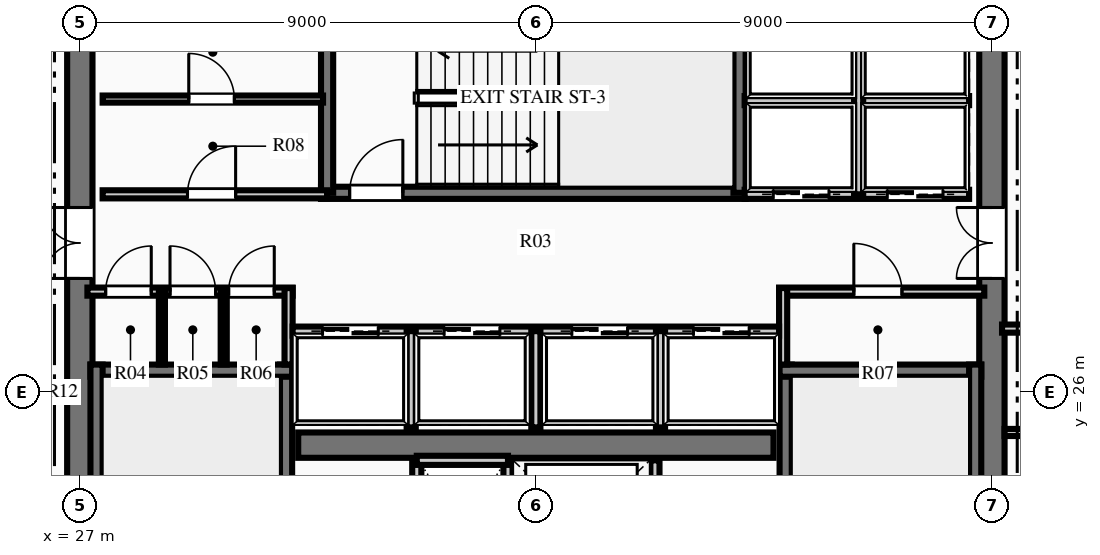
"""IFC4 building model, lengths in metres.
Left out: names, types, materials, properties, quantities, classifications, styles, units other than length and angle.
Written with IfcOpenShell. Run it as: python <this file> out.ifc"""

import sys

from ifc_helpers import new_model, si_unit, direction, frame, frame_2d, origin, place, context, subcontext, project, spatial, rectangle, extrude, element, fill, save


model = new_model("IFC4")
c1 = context("Model", 3, precision=1e-05, world=origin(), true_north=direction((0.0, 1.0)))
c2 = subcontext(c1, "Body", "Model", "MODEL_VIEW")
j1 = project(units=[si_unit("LENGTHUNIT", "METRE"), si_unit("PLANEANGLEUNIT", "RADIAN")], contexts=[c1])
p1 = place(None, origin())
s1 = spatial("IfcSite", under=j1, at=p1, CompositionType="ELEMENT")
p2 = place(p1, origin())
s2 = spatial("IfcBuilding", under=s1, at=p2, CompositionType="ELEMENT")
p3 = place(p2, frame((0.0, 0.0, 235.95)))
s3 = spatial("IfcBuildingStorey", under=s2, at=p3, CompositionType="ELEMENT", Elevation=235.95)
p4 = place(p3, frame((27.0, 18.25, 0.0), z_axis=(0.0, 0.0, 1.0), x_axis=(0.0, 1.0, 0.0)))
e1 = element("IfcWall", 1, at=p4, inside=s3, PredefinedType="SHEAR", context=c2, shape_type="SweptSolid", body=[
    extrude(rectangle(XDim=15.5, YDim=0.5, at=frame_2d((7.75, 0.0))), origin(), (0.0, 0.0, 1.0), 3.75),
])
p5 = place(p4, frame((9.99, 0.0, 0.0)))
e2 = element("IfcOpeningElement", 2, at=p5, cuts=e1, PredefinedType="OPENING", context=c2, shape_type="SweptSolid", body=[
    extrude(rectangle(XDim=1.4, YDim=2.2, at=frame_2d((0.7, 1.1))), frame((0.0, 0.26, 0.0), z_axis=(0.0, -1.0, 0.0), x_axis=(1.0, 0.0, 0.0)), (0.0, 0.0, 1.0), 0.52),
])
p6 = place(p3, frame((45.0, 18.25, 0.0), z_axis=(0.0, 0.0, 1.0), x_axis=(0.0, 1.0, 0.0)))
e3 = element("IfcWall", 3, at=p6, inside=s3, PredefinedType="SHEAR", context=c2, shape_type="SweptSolid", body=[
    extrude(rectangle(XDim=15.5, YDim=0.5, at=frame_2d((7.75, 0.0))), origin(), (0.0, 0.0, 1.0), 3.75),
])
p7 = place(p6, frame((9.99, 0.0, 0.0)))
e4 = element("IfcOpeningElement", 4, at=p7, cuts=e3, PredefinedType="OPENING", context=c2, shape_type="SweptSolid", body=[
    extrude(rectangle(XDim=1.4, YDim=2.2, at=frame_2d((0.7, 1.1))), frame((0.0, 0.26, 0.0), z_axis=(0.0, -1.0, 0.0), x_axis=(1.0, 0.0, 0.0)), (0.0, 0.0, 1.0), 0.52),
])
p8 = place(p3, frame((31.31, 24.95, 0.0), z_axis=(0.0, 0.0, 1.0), x_axis=(1.0, 0.0, 0.0)))
e5 = element("IfcWall", 5, at=p8, inside=s3, PredefinedType="SHEAR", context=c2, shape_type="SweptSolid", body=[
    extrude(rectangle(XDim=9.38, YDim=0.5, at=frame_2d((4.69, 0.0))), origin(), (0.0, 0.0, 1.0), 3.75),
])
p9 = place(p3, frame((31.07, 18.28, 0.0), z_axis=(0.0, 0.0, 1.0), x_axis=(0.0, 1.0, 0.0)))
e6 = element("IfcWall", 6, at=p9, inside=s3, PredefinedType="SHEAR", context=c2, shape_type="SweptSolid", body=[
    extrude(rectangle(XDim=8.26, YDim=0.24, at=frame_2d((4.13, 0.0))), origin(), (0.0, 0.0, 1.0), 3.75),
])
p10 = place(p9, frame((0.365, 0.0, 0.0)))
e7 = element("IfcOpeningElement", 7, at=p10, cuts=e6, PredefinedType="OPENING", context=c2, shape_type="SweptSolid", body=[
    extrude(rectangle(XDim=1.05, YDim=2.15, at=frame_2d((0.525, 1.075))), frame((0.0, 0.13, 0.0), z_axis=(0.0, -1.0, 0.0), x_axis=(1.0, 0.0, 0.0)), (0.0, 0.0, 1.0), 0.26),
])
p11 = place(p3, frame((27.21, 26.42, 0.0), z_axis=(0.0, 0.0, 1.0), x_axis=(1.0, 0.0, 0.0)))
e8 = element("IfcWall", 8, at=p11, inside=s3, PredefinedType="SHEAR", context=c2, shape_type="SweptSolid", body=[
    extrude(rectangle(XDim=3.98, YDim=0.24, at=frame_2d((1.99, 0.0))), origin(), (0.0, 0.0, 1.0), 3.75),
])
p12 = place(p3, frame((27.33, 18.28, 0.0), z_axis=(0.0, 0.0, 1.0), x_axis=(0.0, 1.0, 0.0)))
e9 = element("IfcWall", 9, at=p12, inside=s3, PredefinedType="SHEAR", context=c2, shape_type="SweptSolid", body=[
    extrude(rectangle(XDim=8.26, YDim=0.24, at=frame_2d((4.13, 0.0))), origin(), (0.0, 0.0, 1.0), 3.75),
])
p13 = place(p3, frame((40.93, 18.28, 0.0), z_axis=(0.0, 0.0, 1.0), x_axis=(0.0, 1.0, 0.0)))
e10 = element("IfcWall", 10, at=p13, inside=s3, PredefinedType="SHEAR", context=c2, shape_type="SweptSolid", body=[
    extrude(rectangle(XDim=8.26, YDim=0.24, at=frame_2d((4.13, 0.0))), origin(), (0.0, 0.0, 1.0), 3.75),
])
p14 = place(p13, frame((0.365, 0.0, 0.0)))
e11 = element("IfcOpeningElement", 11, at=p14, cuts=e10, PredefinedType="OPENING", context=c2, shape_type="SweptSolid", body=[
    extrude(rectangle(XDim=1.05, YDim=2.15, at=frame_2d((0.525, 1.075))), frame((0.0, 0.13, 0.0), z_axis=(0.0, -1.0, 0.0), x_axis=(1.0, 0.0, 0.0)), (0.0, 0.0, 1.0), 0.26),
])
p15 = place(p3, frame((40.81, 26.42, 0.0), z_axis=(0.0, 0.0, 1.0), x_axis=(1.0, 0.0, 0.0)))
e12 = element("IfcWall", 12, at=p15, inside=s3, PredefinedType="SHEAR", context=c2, shape_type="SweptSolid", body=[
    extrude(rectangle(XDim=3.98, YDim=0.24, at=frame_2d((1.99, 0.0))), origin(), (0.0, 0.0, 1.0), 3.75),
])
p16 = place(p3, frame((44.67, 18.28, 0.0), z_axis=(0.0, 0.0, 1.0), x_axis=(0.0, 1.0, 0.0)))
e13 = element("IfcWall", 13, at=p16, inside=s3, PredefinedType="SHEAR", context=c2, shape_type="SweptSolid", body=[
    extrude(rectangle(XDim=8.26, YDim=0.24, at=frame_2d((4.13, 0.0))), origin(), (0.0, 0.0, 1.0), 3.75),
])
p17 = place(p3, frame((31.76, 29.93, 0.0), z_axis=(0.0, 0.0, 1.0), x_axis=(1.0, 0.0, 0.0)))
e14 = element("IfcWall", 14, at=p17, inside=s3, PredefinedType="SHEAR", context=c2, shape_type="SweptSolid", body=[
    extrude(rectangle(XDim=8.38, YDim=0.24, at=frame_2d((4.19, 0.0))), origin(), (0.0, 0.0, 1.0), 3.75),
])
p18 = place(p17, frame((0.565, 0.0, 0.0)))
e15 = element("IfcOpeningElement", 15, at=p18, cuts=e14, PredefinedType="OPENING", context=c2, shape_type="SweptSolid", body=[
    extrude(rectangle(XDim=1.05, YDim=2.15, at=frame_2d((0.525, 1.075))), frame((0.0, 0.13, 0.0), z_axis=(0.0, -1.0, 0.0), x_axis=(1.0, 0.0, 0.0)), (0.0, 0.0, 1.0), 0.26),
])
p19 = place(p3, frame((31.88, 29.93, 0.0), z_axis=(0.0, 0.0, 1.0), x_axis=(0.0, 1.0, 0.0)))
e16 = element("IfcWall", 16, at=p19, inside=s3, PredefinedType="SHEAR", context=c2, shape_type="SweptSolid", body=[
    extrude(rectangle(XDim=3.79, YDim=0.24, at=frame_2d((1.895, 0.0))), origin(), (0.0, 0.0, 1.0), 3.75),
])
p20 = place(p3, frame((40.02, 29.93, 0.0), z_axis=(0.0, 0.0, 1.0), x_axis=(0.0, 1.0, 0.0)))
e17 = element("IfcWall", 17, at=p20, inside=s3, PredefinedType="SHEAR", context=c2, shape_type="SweptSolid", body=[
    extrude(rectangle(XDim=3.85, YDim=0.24, at=frame_2d((1.925, 0.0))), origin(), (0.0, 0.0, 1.0), 3.75),
])
for number, where, z_axis, x_axis in (
    (18, (33.65, 22.05, 0.0), (0.0, 0.0, 1.0), (0.0, 1.0, 0.0)),
    (19, (35.45, 22.05, 0.0), (0.0, 0.0, 1.0), (0.0, 1.0, 0.0)),
):
    element("IfcWall", number, at=place(p3, frame(where, z_axis=z_axis, x_axis=x_axis)), inside=s3, PredefinedType="PARTITIONING", context=c2, shape_type="SweptSolid", body=[
        extrude(rectangle(XDim=2.6, YDim=0.18, at=frame_2d((1.3, 0.0))), origin(), (0.0, 0.0, 1.0), 3.4),
    ])
p21 = place(p3, frame((33.65, 24.65, 0.0), z_axis=(0.0, 0.0, 1.0), x_axis=(1.0, 0.0, 0.0)))
e20 = element("IfcWall", 20, at=p21, inside=s3, PredefinedType="PARTITIONING", context=c2, shape_type="SweptSolid", body=[
    extrude(rectangle(XDim=1.8, YDim=0.18, at=frame_2d((0.9, 0.0))), origin(), (0.0, 0.0, 1.0), 3.4),
])
p22 = place(p3, frame((38.35, 22.05, 0.0), z_axis=(0.0, 0.0, 1.0), x_axis=(0.0, 1.0, 0.0)))
e21 = element("IfcWall", 21, at=p22, inside=s3, PredefinedType="PARTITIONING", context=c2, shape_type="SweptSolid", body=[
    extrude(rectangle(XDim=2.6, YDim=0.18, at=frame_2d((1.3, 0.0))), origin(), (0.0, 0.0, 1.0), 3.4),
])
p23 = place(p3, frame((27.15, 27.98, 0.0), z_axis=(0.0, 0.0, 1.0), x_axis=(1.0, 0.0, 0.0)))
e22 = element("IfcWall", 22, at=p23, inside=s3, PredefinedType="PARTITIONING", context=c2, shape_type="SweptSolid", body=[
    extrude(rectangle(XDim=4.05, YDim=0.16, at=frame_2d((2.025, 0.0))), origin(), (0.0, 0.0, 1.0), 3.4),
])
p24 = place(p23, frame((0.36, 0.0, 0.0)))
e23 = element("IfcOpeningElement", 23, at=p24, cuts=e22, PredefinedType="OPENING", context=c2, shape_type="SweptSolid", body=[
    extrude(rectangle(XDim=0.9, YDim=2.15, at=frame_2d((0.45, 1.075))), frame((0.0, 0.09, 0.0), z_axis=(0.0, -1.0, 0.0), x_axis=(1.0, 0.0, 0.0)), (0.0, 0.0, 1.0), 0.18),
])
p25 = place(p23, frame((1.63, 0.0, 0.0)))
e24 = element("IfcOpeningElement", 24, at=p25, cuts=e22, PredefinedType="OPENING", context=c2, shape_type="SweptSolid", body=[
    extrude(rectangle(XDim=0.9, YDim=2.15, at=frame_2d((0.45, 1.075))), frame((0.0, 0.09, 0.0), z_axis=(0.0, -1.0, 0.0), x_axis=(1.0, 0.0, 0.0)), (0.0, 0.0, 1.0), 0.18),
])
p26 = place(p23, frame((2.788, 0.0, 0.0)))
e25 = element("IfcOpeningElement", 25, at=p26, cuts=e22, PredefinedType="OPENING", context=c2, shape_type="SweptSolid", body=[
    extrude(rectangle(XDim=0.9, YDim=2.15, at=frame_2d((0.45, 1.075))), frame((0.0, 0.09, 0.0), z_axis=(0.0, -1.0, 0.0), x_axis=(1.0, 0.0, 0.0)), (0.0, 0.0, 1.0), 0.18),
])
p27 = place(p3, frame((31.12, 26.54, 0.0), z_axis=(0.0, 0.0, 1.0), x_axis=(0.0, 1.0, 0.0)))
e26 = element("IfcWall", 26, at=p27, inside=s3, PredefinedType="PARTITIONING", context=c2, shape_type="SweptSolid", body=[
    extrude(rectangle(XDim=1.51, YDim=0.16, at=frame_2d((0.755, 0.0))), origin(), (0.0, 0.0, 1.0), 3.4),
])
p28 = place(p3, frame((40.8, 27.98, 0.0), z_axis=(0.0, 0.0, 1.0), x_axis=(1.0, 0.0, 0.0)))
e27 = element("IfcWall", 27, at=p28, inside=s3, PredefinedType="PARTITIONING", context=c2, shape_type="SweptSolid", body=[
    extrude(rectangle(XDim=4.05, YDim=0.16, at=frame_2d((2.025, 0.0))), origin(), (0.0, 0.0, 1.0), 3.4),
])
p29 = place(p28, frame((1.475, 0.0, 0.0)))
e28 = element("IfcOpeningElement", 28, at=p29, cuts=e27, PredefinedType="OPENING", context=c2, shape_type="SweptSolid", body=[
    extrude(rectangle(XDim=0.95, YDim=2.15, at=frame_2d((0.475, 1.075))), frame((0.0, 0.09, 0.0), z_axis=(0.0, -1.0, 0.0), x_axis=(1.0, 0.0, 0.0)), (0.0, 0.0, 1.0), 0.18),
])
p30 = place(p3, frame((40.88, 26.54, 0.0), z_axis=(0.0, 0.0, 1.0), x_axis=(0.0, 1.0, 0.0)))
e29 = element("IfcWall", 29, at=p30, inside=s3, PredefinedType="PARTITIONING", context=c2, shape_type="SweptSolid", body=[
    extrude(rectangle(XDim=1.51, YDim=0.16, at=frame_2d((0.755, 0.0))), origin(), (0.0, 0.0, 1.0), 3.4),
])
for number, where, z_axis, x_axis in (
    (30, (28.62, 26.54, 0.0), (0.0, 0.0, 1.0), (0.0, 1.0, 0.0)),
    (31, (29.84, 26.54, 0.0), (0.0, 0.0, 1.0), (0.0, 1.0, 0.0)),
):
    element("IfcWall", number, at=place(p3, frame(where, z_axis=z_axis, x_axis=x_axis)), inside=s3, PredefinedType="PARTITIONING", context=c2, shape_type="SweptSolid", body=[
        extrude(rectangle(XDim=1.44, YDim=0.12, at=frame_2d((0.72, 0.0))), origin(), (0.0, 0.0, 1.0), 3.4),
    ])
p31 = place(p3, frame((27.45, 29.9, 0.0), z_axis=(0.0, 0.0, 1.0), x_axis=(1.0, 0.0, 0.0)))
e32 = element("IfcWall", 32, at=p31, inside=s3, PredefinedType="PARTITIONING", context=c2, shape_type="SweptSolid", body=[
    extrude(rectangle(XDim=4.43, YDim=0.16, at=frame_2d((2.215, 0.0))), origin(), (0.0, 0.0, 1.0), 3.4),
])
p32 = place(p31, frame((1.675, 0.0, 0.0)))
e33 = element("IfcOpeningElement", 33, at=p32, cuts=e32, PredefinedType="OPENING", context=c2, shape_type="SweptSolid", body=[
    extrude(rectangle(XDim=0.95, YDim=2.15, at=frame_2d((0.475, 1.075))), frame((0.0, 0.09, 0.0), z_axis=(0.0, -1.0, 0.0), x_axis=(1.0, 0.0, 0.0)), (0.0, 0.0, 1.0), 0.18),
])
p33 = place(p3, frame((27.45, 31.78, 0.0), z_axis=(0.0, 0.0, 1.0), x_axis=(1.0, 0.0, 0.0)))
e34 = element("IfcWall", 34, at=p33, inside=s3, PredefinedType="PARTITIONING", context=c2, shape_type="SweptSolid", body=[
    extrude(rectangle(XDim=4.35, YDim=0.14, at=frame_2d((2.175, 0.0))), origin(), (0.0, 0.0, 1.0), 3.4),
])
p34 = place(p33, frame((1.7, 0.0, 0.0)))
e35 = element("IfcOpeningElement", 35, at=p34, cuts=e34, PredefinedType="OPENING", context=c2, shape_type="SweptSolid", body=[
    extrude(rectangle(XDim=0.9, YDim=2.15, at=frame_2d((0.45, 1.075))), frame((0.0, 0.08, 0.0), z_axis=(0.0, -1.0, 0.0), x_axis=(1.0, 0.0, 0.0)), (0.0, 0.0, 1.0), 0.16),
])
p35 = place(p3, frame((40.12, 29.9, 0.0), z_axis=(0.0, 0.0, 1.0), x_axis=(1.0, 0.0, 0.0)))
e36 = element("IfcWall", 36, at=p35, inside=s3, PredefinedType="PARTITIONING", context=c2, shape_type="SweptSolid", body=[
    extrude(rectangle(XDim=4.43, YDim=0.18, at=frame_2d((2.215, 0.0))), origin(), (0.0, 0.0, 1.0), 3.4),
])
p36 = place(p35, frame((0.565, 0.0, 0.0)))
e37 = element("IfcOpeningElement", 37, at=p36, cuts=e36, PredefinedType="OPENING", context=c2, shape_type="SweptSolid", body=[
    extrude(rectangle(XDim=1.1, YDim=2.15, at=frame_2d((0.55, 1.075))), frame((0.0, 0.1, 0.0), z_axis=(0.0, -1.0, 0.0), x_axis=(1.0, 0.0, 0.0)), (0.0, 0.0, 1.0), 0.2),
])
p37 = place(p35, frame((2.815, 0.0, 0.0)))
e38 = element("IfcOpeningElement", 38, at=p37, cuts=e36, PredefinedType="OPENING", context=c2, shape_type="SweptSolid", body=[
    extrude(rectangle(XDim=1.1, YDim=2.15, at=frame_2d((0.55, 1.075))), frame((0.0, 0.1, 0.0), z_axis=(0.0, -1.0, 0.0), x_axis=(1.0, 0.0, 0.0)), (0.0, 0.0, 1.0), 0.2),
])
p38 = place(p3, frame((40.12, 31.75, 0.0), z_axis=(0.0, 0.0, 1.0), x_axis=(1.0, 0.0, 0.0)))
e39 = element("IfcWall", 39, at=p38, inside=s3, PredefinedType="PARTITIONING", context=c2, shape_type="SweptSolid", body=[
    extrude(rectangle(XDim=4.43, YDim=0.18, at=frame_2d((2.215, 0.0))), origin(), (0.0, 0.0, 1.0), 3.4),
])
p39 = place(p3, frame((42.37, 29.9, 0.0), z_axis=(0.0, 0.0, 1.0), x_axis=(0.0, 1.0, 0.0)))
e40 = element("IfcWall", 40, at=p39, inside=s3, PredefinedType="PARTITIONING", context=c2, shape_type="SweptSolid", body=[
    extrude(rectangle(XDim=3.75, YDim=0.18, at=frame_2d((1.875, 0.0))), origin(), (0.0, 0.0, 1.0), 3.4),
])
p40 = place(p3, frame((31.2, 27.2, 0.0), z_axis=(0.0, 0.0, 1.0), x_axis=(1.0, 0.0, 0.0)))
e41 = element("IfcWall", 41, at=p40, inside=s3, PredefinedType="PARTITIONING", context=c2, shape_type="SweptSolid", body=[
    extrude(rectangle(XDim=9.6, YDim=0.18, at=frame_2d((4.8, 0.0))), origin(), (0.0, 0.0, 1.0), 3.4),
])
p41 = place(p40, frame((0.59, 0.0, 0.0)))
e42 = element("IfcOpeningElement", 42, at=p41, cuts=e41, PredefinedType="OPENING", context=c2, shape_type="SweptSolid", body=[
    extrude(rectangle(XDim=1.1, YDim=2.15, at=frame_2d((0.55, 1.075))), frame((0.0, 0.1, 0.0), z_axis=(0.0, -1.0, 0.0), x_axis=(1.0, 0.0, 0.0)), (0.0, 0.0, 1.0), 0.2),
])
p42 = place(p40, frame((2.99, 0.0, 0.0)))
e43 = element("IfcOpeningElement", 43, at=p42, cuts=e41, PredefinedType="OPENING", context=c2, shape_type="SweptSolid", body=[
    extrude(rectangle(XDim=1.1, YDim=2.15, at=frame_2d((0.55, 1.075))), frame((0.0, 0.1, 0.0), z_axis=(0.0, -1.0, 0.0), x_axis=(1.0, 0.0, 0.0)), (0.0, 0.0, 1.0), 0.2),
])
p43 = place(p40, frame((5.51, 0.0, 0.0)))
e44 = element("IfcOpeningElement", 44, at=p43, cuts=e41, PredefinedType="OPENING", context=c2, shape_type="SweptSolid", body=[
    extrude(rectangle(XDim=1.1, YDim=2.15, at=frame_2d((0.55, 1.075))), frame((0.0, 0.1, 0.0), z_axis=(0.0, -1.0, 0.0), x_axis=(1.0, 0.0, 0.0)), (0.0, 0.0, 1.0), 0.2),
])
p44 = place(p40, frame((7.91, 0.0, 0.0)))
e45 = element("IfcOpeningElement", 45, at=p44, cuts=e41, PredefinedType="OPENING", context=c2, shape_type="SweptSolid", body=[
    extrude(rectangle(XDim=1.1, YDim=2.15, at=frame_2d((0.55, 1.075))), frame((0.0, 0.1, 0.0), z_axis=(0.0, -1.0, 0.0), x_axis=(1.0, 0.0, 0.0)), (0.0, 0.0, 1.0), 0.2),
])
for number, where, z_axis, x_axis in (
    (46, (33.54, 25.3, 0.0), (0.0, 0.0, 1.0), (0.0, 1.0, 0.0)),
    (47, (36.0, 25.3, 0.0), (0.0, 0.0, 1.0), (0.0, 1.0, 0.0)),
    (48, (38.46, 25.3, 0.0), (0.0, 0.0, 1.0), (0.0, 1.0, 0.0)),
):
    element("IfcWall", number, at=place(p3, frame(where, z_axis=z_axis, x_axis=x_axis)), inside=s3, PredefinedType="PARTITIONING", context=c2, shape_type="SweptSolid", body=[
        extrude(rectangle(XDim=1.9, YDim=0.18, at=frame_2d((0.95, 0.0))), origin(), (0.0, 0.0, 1.0), 3.4),
    ])
p45 = place(p3, frame((45.2, 27.25, 0.0), z_axis=(0.0, 0.0, 1.0), x_axis=(1.0, 0.0, 0.0)))
e49 = element("IfcWall", 49, at=p45, inside=s3, PredefinedType="PARTITIONING", context=c2, shape_type="SweptSolid", body=[
    extrude(rectangle(XDim=2.25, YDim=0.16, at=frame_2d((1.125, 0.0))), origin(), (0.0, 0.0, 1.0), 3.4),
])
p46 = place(p3, frame((45.25, 25.2, 0.0), z_axis=(0.0, 0.0, 1.0), x_axis=(1.0, 0.0, 0.0)))
e50 = element("IfcWall", 50, at=p46, inside=s3, PredefinedType="PARTITIONING", context=c2, shape_type="SweptSolid", body=[
    extrude(rectangle(XDim=16.674, YDim=0.14, at=frame_2d((8.337, 0.0))), origin(), (0.0, 0.0, 1.0), 2.779),
])
p47 = place(p24, origin())
e51 = element("IfcDoor", 51, at=p47, inside=s3, OperationType="SINGLE_SWING_RIGHT", PredefinedType="DOOR", context=c2, shape_type="SweptSolid", body=[
    extrude(rectangle(XDim=0.9, YDim=2.15, at=frame_2d((0.45, 1.075))), frame((0.0, 0.025, 0.0), z_axis=(0.0, -1.0, 0.0), x_axis=(1.0, 0.0, 0.0)), (0.0, 0.0, 1.0), 0.05),
])
fill(e23, e51)
p48 = place(p25, origin())
e52 = element("IfcDoor", 52, at=p48, inside=s3, OperationType="SINGLE_SWING_LEFT", PredefinedType="DOOR", context=c2, shape_type="SweptSolid", body=[
    extrude(rectangle(XDim=0.9, YDim=2.15, at=frame_2d((0.45, 1.075))), frame((0.0, 0.025, 0.0), z_axis=(0.0, -1.0, 0.0), x_axis=(1.0, 0.0, 0.0)), (0.0, 0.0, 1.0), 0.05),
])
fill(e24, e52)
p49 = place(p26, origin())
e53 = element("IfcDoor", 53, at=p49, inside=s3, OperationType="SINGLE_SWING_RIGHT", PredefinedType="DOOR", context=c2, shape_type="SweptSolid", body=[
    extrude(rectangle(XDim=0.9, YDim=2.15, at=frame_2d((0.45, 1.075))), frame((0.0, 0.025, 0.0), z_axis=(0.0, -1.0, 0.0), x_axis=(1.0, 0.0, 0.0)), (0.0, 0.0, 1.0), 0.05),
])
fill(e25, e53)
p50 = place(p29, origin())
e54 = element("IfcDoor", 54, at=p50, inside=s3, OperationType="SINGLE_SWING_LEFT", PredefinedType="DOOR", context=c2, shape_type="SweptSolid", body=[
    extrude(rectangle(XDim=0.95, YDim=2.15, at=frame_2d((0.475, 1.075))), frame((0.0, 0.025, 0.0), z_axis=(0.0, -1.0, 0.0), x_axis=(1.0, 0.0, 0.0)), (0.0, 0.0, 1.0), 0.05),
])
fill(e28, e54)
p51 = place(p32, origin())
e55 = element("IfcDoor", 55, at=p51, inside=s3, OperationType="SINGLE_SWING_RIGHT", PredefinedType="DOOR", context=c2, shape_type="SweptSolid", body=[
    extrude(rectangle(XDim=0.95, YDim=2.15, at=frame_2d((0.475, 1.075))), frame((0.0, 0.025, 0.0), z_axis=(0.0, -1.0, 0.0), x_axis=(1.0, 0.0, 0.0)), (0.0, 0.0, 1.0), 0.05),
])
fill(e33, e55)
p52 = place(p34, origin())
e56 = element("IfcDoor", 56, at=p52, inside=s3, OperationType="SINGLE_SWING_LEFT", PredefinedType="DOOR", context=c2, shape_type="SweptSolid", body=[
    extrude(rectangle(XDim=0.9, YDim=2.15, at=frame_2d((0.45, 1.075))), frame((0.0, 0.025, 0.0), z_axis=(0.0, -1.0, 0.0), x_axis=(1.0, 0.0, 0.0)), (0.0, 0.0, 1.0), 0.05),
])
fill(e35, e56)
p53 = place(p18, origin())
e57 = element("IfcDoor", 57, at=p53, inside=s3, OperationType="SINGLE_SWING_RIGHT", PredefinedType="DOOR", context=c2, shape_type="SweptSolid", body=[
    extrude(rectangle(XDim=1.05, YDim=2.15, at=frame_2d((0.525, 1.075))), frame((0.0, 0.025, 0.0), z_axis=(0.0, -1.0, 0.0), x_axis=(1.0, 0.0, 0.0)), (0.0, 0.0, 1.0), 0.05),
])
fill(e15, e57)
p54 = place(p5, origin())
e58 = element("IfcDoor", 58, at=p54, inside=s3, OperationType="DOUBLE_DOOR_SINGLE_SWING", PredefinedType="DOOR", context=c2, shape_type="SweptSolid", body=[
    extrude(rectangle(XDim=1.4, YDim=2.2, at=frame_2d((0.7, 1.1))), frame((0.0, 0.025, 0.0), z_axis=(0.0, -1.0, 0.0), x_axis=(1.0, 0.0, 0.0)), (0.0, 0.0, 1.0), 0.05),
])
fill(e2, e58)
p55 = place(p7, origin())
e59 = element("IfcDoor", 59, at=p55, inside=s3, OperationType="DOUBLE_DOOR_SINGLE_SWING", PredefinedType="DOOR", context=c2, shape_type="SweptSolid", body=[
    extrude(rectangle(XDim=1.4, YDim=2.2, at=frame_2d((0.7, 1.1))), frame((0.0, 0.025, 0.0), z_axis=(0.0, -1.0, 0.0), x_axis=(1.0, 0.0, 0.0)), (0.0, 0.0, 1.0), 0.05),
])
fill(e4, e59)
p56 = place(p36, origin())
e60 = element("IfcDoor", 60, at=p56, inside=s3, OperationType="SLIDING_TO_LEFT", PredefinedType="DOOR", context=c2, shape_type="SweptSolid", body=[
    extrude(rectangle(XDim=1.1, YDim=2.15, at=frame_2d((0.55, 1.075))), frame((0.0, 0.025, 0.0), z_axis=(0.0, -1.0, 0.0), x_axis=(1.0, 0.0, 0.0)), (0.0, 0.0, 1.0), 0.05),
])
fill(e37, e60)
p57 = place(p37, origin())
e61 = element("IfcDoor", 61, at=p57, inside=s3, OperationType="SLIDING_TO_LEFT", PredefinedType="DOOR", context=c2, shape_type="SweptSolid", body=[
    extrude(rectangle(XDim=1.1, YDim=2.15, at=frame_2d((0.55, 1.075))), frame((0.0, 0.025, 0.0), z_axis=(0.0, -1.0, 0.0), x_axis=(1.0, 0.0, 0.0)), (0.0, 0.0, 1.0), 0.05),
])
fill(e38, e61)
p58 = place(p41, origin())
e62 = element("IfcDoor", 62, at=p58, inside=s3, OperationType="SLIDING_TO_LEFT", PredefinedType="DOOR", context=c2, shape_type="SweptSolid", body=[
    extrude(rectangle(XDim=1.1, YDim=2.15, at=frame_2d((0.55, 1.075))), frame((0.0, 0.025, 0.0), z_axis=(0.0, -1.0, 0.0), x_axis=(1.0, 0.0, 0.0)), (0.0, 0.0, 1.0), 0.05),
])
fill(e42, e62)
p59 = place(p42, origin())
e63 = element("IfcDoor", 63, at=p59, inside=s3, OperationType="SLIDING_TO_LEFT", PredefinedType="DOOR", context=c2, shape_type="SweptSolid", body=[
    extrude(rectangle(XDim=1.1, YDim=2.15, at=frame_2d((0.55, 1.075))), frame((0.0, 0.025, 0.0), z_axis=(0.0, -1.0, 0.0), x_axis=(1.0, 0.0, 0.0)), (0.0, 0.0, 1.0), 0.05),
])
fill(e43, e63)
p60 = place(p43, origin())
e64 = element("IfcDoor", 64, at=p60, inside=s3, OperationType="SLIDING_TO_LEFT", PredefinedType="DOOR", context=c2, shape_type="SweptSolid", body=[
    extrude(rectangle(XDim=1.1, YDim=2.15, at=frame_2d((0.55, 1.075))), frame((0.0, 0.025, 0.0), z_axis=(0.0, -1.0, 0.0), x_axis=(1.0, 0.0, 0.0)), (0.0, 0.0, 1.0), 0.05),
])
fill(e44, e64)
p61 = place(p44, origin())
e65 = element("IfcDoor", 65, at=p61, inside=s3, OperationType="SLIDING_TO_LEFT", PredefinedType="DOOR", context=c2, shape_type="SweptSolid", body=[
    extrude(rectangle(XDim=1.1, YDim=2.15, at=frame_2d((0.55, 1.075))), frame((0.0, 0.025, 0.0), z_axis=(0.0, -1.0, 0.0), x_axis=(1.0, 0.0, 0.0)), (0.0, 0.0, 1.0), 0.05),
])
fill(e45, e65)
save(model, sys.argv[1])
